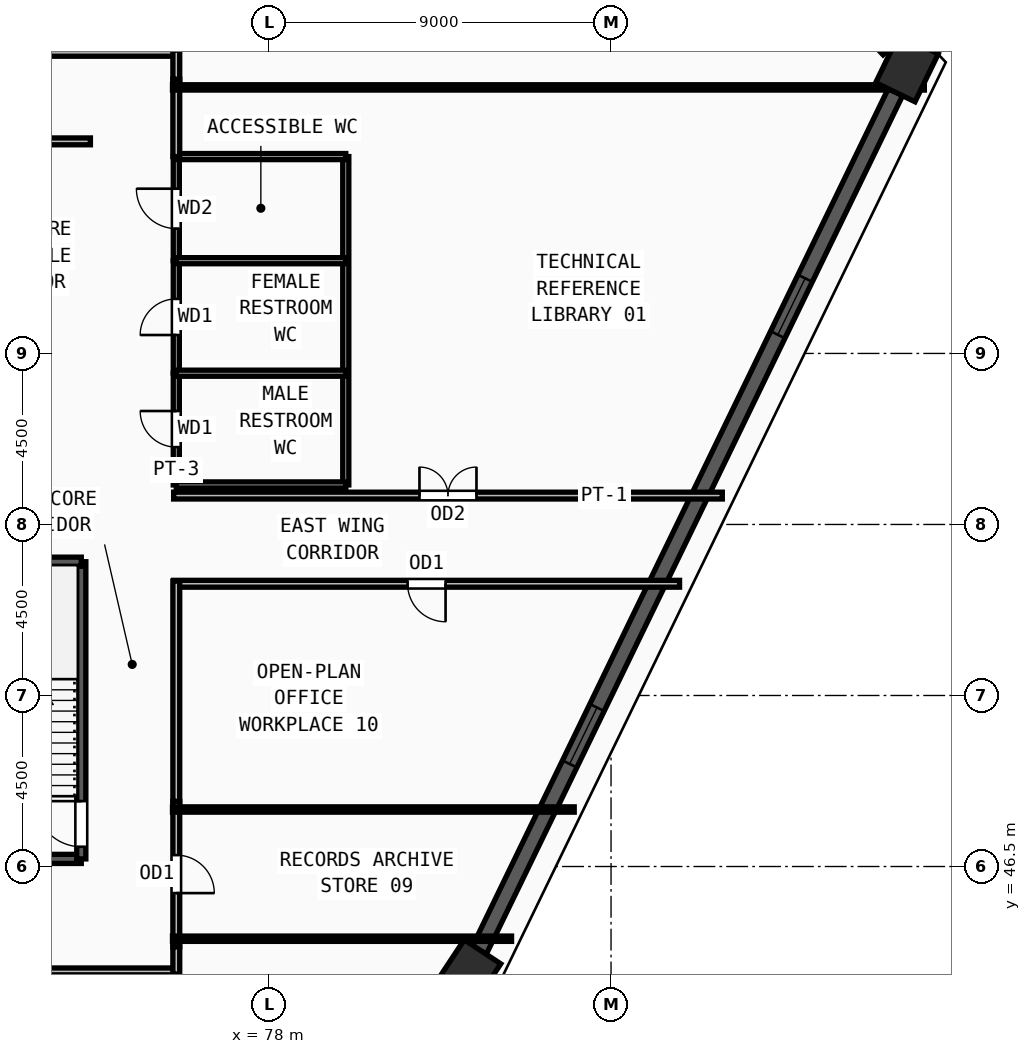
"""IFC4 building model, lengths in metres.
Left out: names, types, materials, properties, quantities, classifications, styles, units other than length and angle.
Written with IfcOpenShell. Run it as: python <this file> out.ifc"""

import sys

from ifc_helpers import new_model, si_unit, direction, frame, frame_2d, origin, origin_2d, place, context, subcontext, project, spatial, rectangle, extrude, source, transform, mapped, element, fill, save


model = new_model("IFC4")
c1 = context("Model", 3, precision=1e-05, world=origin(), true_north=direction((0.0, 1.0)))
c2 = subcontext(c1, "Body", "Model", "MODEL_VIEW")
j1 = project(units=[si_unit("LENGTHUNIT", "METRE"), si_unit("PLANEANGLEUNIT", "RADIAN")], contexts=[c1])
p1 = place(None, origin())
s1 = spatial("IfcSite", under=j1, at=p1, CompositionType="ELEMENT")
p2 = place(p1, origin())
s2 = spatial("IfcBuilding", under=s1, at=p2, CompositionType="ELEMENT")
p3 = place(p2, frame((0.0, 0.0, 166.5)))
s3 = spatial("IfcBuildingStorey", under=s2, at=p3, CompositionType="ELEMENT", Elevation=166.5)
m1 = source(origin(), c2, "Body", "SweptSolid", [
    extrude(rectangle(XDim=1.4, YDim=1.15, at=origin_2d()), origin(), (0.0, 0.0, 1.0), 3.75),
])
for number, where, z_axis, x_axis in (
    (1, (94.787, 67.503, 0.0), (0.0, 0.0, 1.0), (0.436, 0.9, 0.0)),
    (2, (83.232, 43.672, 0.0), (0.0, 0.0, 1.0), (0.551, 0.834, 0.0)),
):
    element("IfcColumn", number, at=place(p3, frame(where, z_axis=z_axis, x_axis=x_axis)), inside=s3, PredefinedType="COLUMN", context=c2, shape_type="MappedRepresentation", body=[
        mapped(m1, transform((0.0, 0.0, 0.0), x_axis=(1.0, 0.0, 0.0), y_axis=(0.0, 1.0, 0.0), z_axis=(0.0, 0.0, 1.0), scale=1.0)),
    ])
p4 = place(p3, frame((83.533, 44.293, 0.0), z_axis=(0.0, 0.0, 1.0), x_axis=(0.43630023006, 0.899801149838, 0.0)))
e3 = element("IfcWall", 3, at=p4, inside=s3, PredefinedType="SOLIDWALL", context=c2, shape_type="SweptSolid", body=[
    extrude(rectangle(XDim=25.104, YDim=0.42, at=frame_2d((12.552, 0.0))), origin(), (0.0, 0.0, 1.0), 3.57),
])
m2 = source(origin(), c2, "Body", "SweptSolid", [
    extrude(rectangle(XDim=1.65, YDim=1.95, at=frame_2d((0.825, 0.975))), frame((0.0, 0.22, 0.0), z_axis=(0.0, -1.0, 0.0), x_axis=(1.0, 0.0, 0.0)), (0.0, 0.0, 1.0), 0.44),
])
p5 = place(p4, frame((5.451, 0.0, 0.55)))
e4 = element("IfcOpeningElement", 4, at=p5, cuts=e3, PredefinedType="OPENING", context=c2, shape_type="MappedRepresentation", body=[
    mapped(m2, transform((0.0, 0.0, 0.0), x_axis=(1.0, 0.0, 0.0), y_axis=(0.0, 1.0, 0.0), z_axis=(0.0, 0.0, 1.0), scale=1.0)),
])
p6 = place(p4, frame((18.003, 0.0, 0.55)))
e5 = element("IfcOpeningElement", 5, at=p6, cuts=e3, PredefinedType="OPENING", context=c2, shape_type="MappedRepresentation", body=[
    mapped(m2, transform((0.0, 0.0, 0.0), x_axis=(1.0, 0.0, 0.0), y_axis=(0.0, 1.0, 0.0), z_axis=(0.0, 0.0, 1.0), scale=1.0)),
])
p7 = place(p3, frame((94.311, 68.003, 0.0), z_axis=(0.0, 0.0, 1.0), x_axis=(-0.689155878993, 0.724613120534, 0.0)))
e6 = element("IfcWall", 6, at=p7, inside=s3, PredefinedType="SOLIDWALL", context=c2, shape_type="SweptSolid", body=[
    extrude(rectangle(XDim=4.482, YDim=0.42, at=frame_2d((2.241, 0.0))), origin(), (0.0, 0.0, 1.0), 3.57),
])
m3 = source(origin(), c2, "Body", "SweptSolid", [
    extrude(rectangle(XDim=1.2, YDim=1.9, at=frame_2d((0.6, 0.95))), frame((0.0, 0.22, 0.0), z_axis=(0.0, -1.0, 0.0), x_axis=(1.0, 0.0, 0.0)), (0.0, 0.0, 1.0), 0.44),
])
p8 = place(p7, frame((1.641, 0.0, 0.55)))
e7 = element("IfcOpeningElement", 7, at=p8, cuts=e6, PredefinedType="OPENING", context=c2, shape_type="MappedRepresentation", body=[
    mapped(m3, transform((0.0, 0.0, 0.0), x_axis=(1.0, 0.0, 0.0), y_axis=(0.0, 1.0, 0.0), z_axis=(0.0, 0.0, 1.0), scale=1.0)),
])
p9 = place(p3, frame((69.62, 46.7, 0.0), z_axis=(0.0, 0.0, 1.0), x_axis=(1.0, 0.0, 0.0)))
e8 = element("IfcWall", 8, at=p9, inside=s3, PredefinedType="SOLIDWALL", context=c2, shape_type="SweptSolid", body=[
    extrude(rectangle(XDim=3.44, YDim=0.24, at=frame_2d((1.72, 0.0))), origin(), (0.0, 0.0, 1.0), 3.57),
])
p10 = place(p3, frame((73.06, 46.7, 0.0), z_axis=(0.0, 0.0, 1.0), x_axis=(0.0, 1.0, 0.0)))
e9 = element("IfcWall", 9, at=p10, inside=s3, PredefinedType="SOLIDWALL", context=c2, shape_type="SweptSolid", body=[
    extrude(rectangle(XDim=7.82, YDim=0.24, at=frame_2d((3.91, 0.0))), origin(), (0.0, 0.0, 1.0), 3.57),
])
m4 = source(origin(), c2, "Body", "SweptSolid", [
    extrude(rectangle(XDim=1.2, YDim=2.2, at=frame_2d((0.6, 1.1))), frame((0.0, 0.13, 0.0), z_axis=(0.0, -1.0, 0.0), x_axis=(1.0, 0.0, 0.0)), (0.0, 0.0, 1.0), 0.26),
])
p11 = place(p10, frame((0.32, 0.0, 0.0)))
e10 = element("IfcOpeningElement", 10, at=p11, cuts=e9, PredefinedType="OPENING", context=c2, shape_type="MappedRepresentation", body=[
    mapped(m4, transform((0.0, 0.0, 0.0), x_axis=(1.0, 0.0, 0.0), y_axis=(0.0, 1.0, 0.0), z_axis=(0.0, 0.0, 1.0), scale=1.0)),
])
p12 = place(p3, frame((73.06, 54.52, 0.0), z_axis=(0.0, 0.0, 1.0), x_axis=(-1.0, 0.0, 0.0)))
e11 = element("IfcWall", 11, at=p12, inside=s3, PredefinedType="SOLIDWALL", context=c2, shape_type="SweptSolid", body=[
    extrude(rectangle(XDim=3.44, YDim=0.24, at=frame_2d((1.72, 0.0))), origin(), (0.0, 0.0, 1.0), 3.57),
])
p13 = place(p3, frame((75.56, 56.54, 0.0), z_axis=(0.0, 0.0, 1.0), x_axis=(0.0, 1.0, 0.0)))
e12 = element("IfcWall", 12, at=p13, inside=s3, PredefinedType="PARTITIONING", context=c2, shape_type="SweptSolid", body=[
    extrude(rectangle(XDim=2.94, YDim=0.16, at=frame_2d((1.47, 0.0))), origin(), (0.0, 0.0, 1.0), 3.57),
])
m5 = source(origin(), c2, "Body", "SweptSolid", [
    extrude(rectangle(XDim=0.95, YDim=2.15, at=frame_2d((0.475, 1.075))), frame((0.0, 0.09, 0.0), z_axis=(0.0, -1.0, 0.0), x_axis=(1.0, 0.0, 0.0)), (0.0, 0.0, 1.0), 0.18),
])
p14 = place(p13, frame((0.995, 0.0, 0.0)))
e13 = element("IfcOpeningElement", 13, at=p14, cuts=e12, PredefinedType="OPENING", context=c2, shape_type="MappedRepresentation", body=[
    mapped(m5, transform((0.0, 0.0, 0.0), x_axis=(1.0, 0.0, 0.0), y_axis=(0.0, 1.0, 0.0), z_axis=(0.0, 0.0, 1.0), scale=1.0)),
])
p15 = place(p3, frame((75.56, 59.48, 0.0), z_axis=(0.0, 0.0, 1.0), x_axis=(0.0, 1.0, 0.0)))
e14 = element("IfcWall", 14, at=p15, inside=s3, PredefinedType="PARTITIONING", context=c2, shape_type="SweptSolid", body=[
    extrude(rectangle(XDim=2.96, YDim=0.16, at=frame_2d((1.48, 0.0))), origin(), (0.0, 0.0, 1.0), 3.57),
])
p16 = place(p15, frame((1.005, 0.0, 0.0)))
e15 = element("IfcOpeningElement", 15, at=p16, cuts=e14, PredefinedType="OPENING", context=c2, shape_type="MappedRepresentation", body=[
    mapped(m5, transform((0.0, 0.0, 0.0), x_axis=(1.0, 0.0, 0.0), y_axis=(0.0, 1.0, 0.0), z_axis=(0.0, 0.0, 1.0), scale=1.0)),
])
p17 = place(p3, frame((75.56, 62.44, 0.0), z_axis=(0.0, 0.0, 1.0), x_axis=(0.0, 1.0, 0.0)))
e16 = element("IfcWall", 16, at=p17, inside=s3, PredefinedType="PARTITIONING", context=c2, shape_type="SweptSolid", body=[
    extrude(rectangle(XDim=2.74, YDim=0.16, at=frame_2d((1.37, 0.0))), origin(), (0.0, 0.0, 1.0), 3.57),
])
m6 = source(origin(), c2, "Body", "SweptSolid", [
    extrude(rectangle(XDim=1.05, YDim=2.15, at=frame_2d((0.525, 1.075))), frame((0.0, 0.09, 0.0), z_axis=(0.0, -1.0, 0.0), x_axis=(1.0, 0.0, 0.0)), (0.0, 0.0, 1.0), 0.18),
])
p18 = place(p17, frame((0.845, 0.0, 0.0)))
e17 = element("IfcOpeningElement", 17, at=p18, cuts=e16, PredefinedType="OPENING", context=c2, shape_type="MappedRepresentation", body=[
    mapped(m6, transform((0.0, 0.0, 0.0), x_axis=(1.0, 0.0, 0.0), y_axis=(0.0, 1.0, 0.0), z_axis=(0.0, 0.0, 1.0), scale=1.0)),
])
p19 = place(p3, frame((69.46, 65.58, 0.0), z_axis=(0.0, 0.0, 1.0), x_axis=(1.0, 0.0, 0.0)))
e18 = element("IfcWall", 18, at=p19, inside=s3, PredefinedType="PARTITIONING", context=c2, shape_type="SweptSolid", body=[
    extrude(rectangle(XDim=3.84, YDim=0.18, at=frame_2d((1.92, 0.0))), origin(), (0.0, 0.0, 1.0), 3.57),
])
m7 = source(origin(), c2, "Body", "SweptSolid", [
    extrude(rectangle(XDim=1.3, YDim=2.2, at=frame_2d((0.65, 1.1))), frame((0.0, 0.1, 0.0), z_axis=(0.0, -1.0, 0.0), x_axis=(1.0, 0.0, 0.0)), (0.0, 0.0, 1.0), 0.2),
])
p20 = place(p19, frame((1.27, 0.0, 0.0)))
e19 = element("IfcOpeningElement", 19, at=p20, cuts=e18, PredefinedType="OPENING", context=c2, shape_type="MappedRepresentation", body=[
    mapped(m7, transform((0.0, 0.0, 0.0), x_axis=(1.0, 0.0, 0.0), y_axis=(0.0, 1.0, 0.0), z_axis=(0.0, 0.0, 1.0), scale=1.0)),
])
p21 = place(p3, frame((75.49, 56.26, 0.0), z_axis=(0.0, 0.0, 1.0), x_axis=(1.0, 0.0, 0.0)))
e20 = element("IfcWall", 20, at=p21, inside=s3, PredefinedType="PARTITIONING", context=c2, shape_type="SweptSolid", body=[
    extrude(rectangle(XDim=14.438, YDim=0.18, at=frame_2d((7.219, 0.0))), origin(), (0.0, 0.0, 1.0), 3.57),
])
m8 = source(origin(), c2, "Body", "SweptSolid", [
    extrude(rectangle(XDim=1.5, YDim=2.2, at=frame_2d((0.75, 1.1))), frame((0.0, 0.1, 0.0), z_axis=(0.0, -1.0, 0.0), x_axis=(1.0, 0.0, 0.0)), (0.0, 0.0, 1.0), 0.2),
])
p22 = place(p21, frame((6.469, 0.0, 0.0)))
e21 = element("IfcOpeningElement", 21, at=p22, cuts=e20, PredefinedType="OPENING", context=c2, shape_type="MappedRepresentation", body=[
    mapped(m8, transform((0.0, 0.0, 0.0), x_axis=(1.0, 0.0, 0.0), y_axis=(0.0, 1.0, 0.0), z_axis=(0.0, 0.0, 1.0), scale=1.0)),
])
p23 = place(p3, frame((61.785, 67.91, 0.0), z_axis=(0.0, 0.0, 1.0), x_axis=(1.0, 0.0, 0.0)))
e22 = element("IfcWall", 22, at=p23, inside=s3, PredefinedType="PARTITIONING", context=c2, shape_type="SweptSolid", body=[
    extrude(rectangle(XDim=13.845, YDim=0.18, at=frame_2d((6.922, 0.0))), origin(), (0.0, 0.0, 1.0), 3.57),
])
p24 = place(p23, frame((6.172, 0.0, 0.0)))
e23 = element("IfcOpeningElement", 23, at=p24, cuts=e22, PredefinedType="OPENING", context=c2, shape_type="MappedRepresentation", body=[
    mapped(m8, transform((0.0, 0.0, 0.0), x_axis=(1.0, 0.0, 0.0), y_axis=(0.0, 1.0, 0.0), z_axis=(0.0, 0.0, 1.0), scale=1.0)),
])
p25 = place(p3, frame((75.63, 43.74, 0.0), z_axis=(0.0, 0.0, 1.0), x_axis=(-1.0, 0.0, 0.0)))
e24 = element("IfcWall", 24, at=p25, inside=s3, PredefinedType="PARTITIONING", context=c2, shape_type="SweptSolid", body=[
    extrude(rectangle(XDim=31.26, YDim=0.18, at=frame_2d((15.63, 0.0))), origin(), (0.0, 0.0, 1.0), 3.57),
])
p26 = place(p25, frame((10.08, 0.0, 0.0)))
e25 = element("IfcOpeningElement", 25, at=p26, cuts=e24, PredefinedType="OPENING", context=c2, shape_type="MappedRepresentation", body=[
    mapped(m8, transform((0.0, 0.0, 0.0), x_axis=(1.0, 0.0, 0.0), y_axis=(0.0, 1.0, 0.0), z_axis=(0.0, 0.0, 1.0), scale=1.0)),
])
p27 = place(p3, frame((75.56, 48.215, 0.0), z_axis=(0.0, 0.0, 1.0), x_axis=(0.0, -1.0, 0.0)))
e26 = element("IfcWall", 26, at=p27, inside=s3, PredefinedType="PARTITIONING", context=c2, shape_type="SweptSolid", body=[
    extrude(rectangle(XDim=3.83, YDim=0.18, at=frame_2d((1.915, 0.0))), origin(), (0.0, 0.0, 1.0), 3.155),
])
m9 = source(origin(), c2, "Body", "SweptSolid", [
    extrude(rectangle(XDim=1.0, YDim=2.2, at=frame_2d((0.5, 1.1))), frame((0.0, 0.1, 0.0), z_axis=(0.0, -1.0, 0.0), x_axis=(1.0, 0.0, 0.0)), (0.0, 0.0, 1.0), 0.2),
])
p28 = place(p27, frame((1.415, 0.0, 0.0)))
e27 = element("IfcOpeningElement", 27, at=p28, cuts=e26, PredefinedType="OPENING", context=c2, shape_type="MappedRepresentation", body=[
    mapped(m9, transform((0.0, 0.0, 0.0), x_axis=(1.0, 0.0, 0.0), y_axis=(0.0, 1.0, 0.0), z_axis=(0.0, 0.0, 1.0), scale=1.0)),
])
p29 = place(p3, frame((88.803, 53.94, 0.0), z_axis=(0.0, 0.0, 1.0), x_axis=(-1.0, 0.0, 0.0)))
e28 = element("IfcWall", 28, at=p29, inside=s3, PredefinedType="PARTITIONING", context=c2, shape_type="SweptSolid", body=[
    extrude(rectangle(XDim=13.313, YDim=0.18, at=frame_2d((6.656, 0.0))), origin(), (0.0, 0.0, 1.0), 3.57),
])
p30 = place(p29, frame((6.157, 0.0, 0.0)))
e29 = element("IfcOpeningElement", 29, at=p30, cuts=e28, PredefinedType="OPENING", context=c2, shape_type="MappedRepresentation", body=[
    mapped(m9, transform((0.0, 0.0, 0.0), x_axis=(1.0, 0.0, 0.0), y_axis=(0.0, 1.0, 0.0), z_axis=(0.0, 0.0, 1.0), scale=1.0)),
])
p31 = place(p3, frame((80.02, 56.54, 0.0), z_axis=(0.0, 0.0, 1.0), x_axis=(0.0, 1.0, 0.0)))
e30 = element("IfcWall", 30, at=p31, inside=s3, PredefinedType="PARTITIONING", context=c2, shape_type="SweptSolid", body=[
    extrude(rectangle(XDim=8.64, YDim=0.16, at=frame_2d((4.32, 0.0))), origin(), (0.0, 0.0, 1.0), 3.57),
])
for number, where, z_axis, x_axis in (
    (31, (75.56, 56.54, 0.0), (0.0, 0.0, 1.0), (1.0, 0.0, 0.0)),
    (32, (75.56, 59.48, 0.0), (0.0, 0.0, 1.0), (1.0, 0.0, 0.0)),
    (33, (75.56, 62.44, 0.0), (0.0, 0.0, 1.0), (1.0, 0.0, 0.0)),
    (34, (75.56, 65.18, 0.0), (0.0, 0.0, 1.0), (1.0, 0.0, 0.0)),
):
    element("IfcWall", number, at=place(p3, frame(where, z_axis=z_axis, x_axis=x_axis)), inside=s3, PredefinedType="PARTITIONING", context=c2, shape_type="SweptSolid", body=[
        extrude(rectangle(XDim=4.46, YDim=0.16, at=frame_2d((2.23, 0.0))), origin(), (0.0, 0.0, 1.0), 3.57),
    ])
p32 = place(p3, frame((75.56, 67.215, 0.0), z_axis=(0.0, 0.0, 1.0), x_axis=(0.0, -1.0, 0.0)))
e35 = element("IfcWall", 35, at=p32, inside=s3, PredefinedType="PARTITIONING", context=c2, shape_type="SweptSolid", body=[
    extrude(rectangle(XDim=2.035, YDim=0.18, at=frame_2d((1.018, 0.0))), origin(), (0.0, 0.0, 1.0), 3.57),
])
p33 = place(p3, frame((75.56, 67.98, 0.0), z_axis=(0.0, 0.0, 1.0), x_axis=(0.0, -1.0, 0.0)))
e36 = element("IfcWall", 36, at=p33, inside=s3, PredefinedType="PARTITIONING", context=c2, shape_type="SweptSolid", body=[
    extrude(rectangle(XDim=0.765, YDim=0.18, at=frame_2d((0.382, 0.0))), origin(), (0.0, 0.0, 1.0), 3.57),
])
p34 = place(p3, frame((75.56, 44.385, 0.0), z_axis=(0.0, 0.0, 1.0), x_axis=(0.0, -1.0, 0.0)))
e37 = element("IfcWall", 37, at=p34, inside=s3, PredefinedType="PARTITIONING", context=c2, shape_type="SweptSolid", body=[
    extrude(rectangle(XDim=0.715, YDim=0.18, at=frame_2d((0.357, 0.0))), origin(), (0.0, 0.0, 1.0), 3.57),
])
p35 = place(p3, frame((75.56, 54.01, 0.0), z_axis=(0.0, 0.0, 1.0), x_axis=(0.0, -1.0, 0.0)))
e38 = element("IfcWall", 38, at=p35, inside=s3, PredefinedType="PARTITIONING", context=c2, shape_type="SweptSolid", body=[
    extrude(rectangle(XDim=5.795, YDim=0.18, at=frame_2d((2.897, 0.0))), origin(), (0.0, 0.0, 1.0), 3.57),
])
p36 = place(p3, frame((75.46, 44.6, 0.0), z_axis=(0.0, 0.0, 1.0), x_axis=(1.0, 0.0, 0.0)))
e39 = element("IfcWall", 39, at=p36, inside=s3, PredefinedType="PARTITIONING", context=c2, shape_type="SweptSolid", body=[
    extrude(rectangle(XDim=8.922, YDim=0.14, at=frame_2d((4.461, 0.0))), origin(), (0.0, 0.0, 1.0), 3.57),
])
p37 = place(p3, frame((75.46, 48.0, 0.0), z_axis=(0.0, 0.0, 1.0), x_axis=(1.0, 0.0, 0.0)))
e40 = element("IfcWall", 40, at=p37, inside=s3, PredefinedType="PARTITIONING", context=c2, shape_type="SweptSolid", body=[
    extrude(rectangle(XDim=10.571, YDim=0.14, at=frame_2d((5.286, 0.0))), origin(), (0.0, 0.0, 1.0), 3.57),
])
p38 = place(p3, frame((75.46, 67.0, 0.0), z_axis=(0.0, 0.0, 1.0), x_axis=(1.0, 0.0, 0.0)))
e41 = element("IfcWall", 41, at=p38, inside=s3, PredefinedType="PARTITIONING", context=c2, shape_type="SweptSolid", body=[
    extrude(rectangle(XDim=19.784, YDim=0.14, at=frame_2d((9.892, 0.0))), origin(), (0.0, 0.0, 1.0), 2.755),
])
m10 = source(origin(), c2, "Body", "SweptSolid", [
    extrude(rectangle(XDim=1.65, YDim=1.95, at=frame_2d((0.825, 0.975))), frame((0.0, 0.03, 0.0), z_axis=(0.0, -1.0, 0.0), x_axis=(1.0, 0.0, 0.0)), (0.0, 0.0, 1.0), 0.06),
])
p39 = place(p5, origin())
e42 = element("IfcWindow", 42, at=p39, inside=s3, PartitioningType="DOUBLE_PANEL_VERTICAL", PredefinedType="WINDOW", context=c2, shape_type="MappedRepresentation", body=[
    mapped(m10, transform((0.0, 0.0, 0.0), x_axis=(1.0, 0.0, 0.0), y_axis=(0.0, 1.0, 0.0), z_axis=(0.0, 0.0, 1.0), scale=1.0)),
])
fill(e4, e42)
p40 = place(p6, origin())
e43 = element("IfcWindow", 43, at=p40, inside=s3, PartitioningType="DOUBLE_PANEL_VERTICAL", PredefinedType="WINDOW", context=c2, shape_type="MappedRepresentation", body=[
    mapped(m10, transform((0.0, 0.0, 0.0), x_axis=(1.0, 0.0, 0.0), y_axis=(0.0, 1.0, 0.0), z_axis=(0.0, 0.0, 1.0), scale=1.0)),
])
fill(e5, e43)
m11 = source(origin(), c2, "Body", "SweptSolid", [
    extrude(rectangle(XDim=1.2, YDim=2.2, at=frame_2d((0.6, 1.1))), frame((0.0, 0.025, 0.0), z_axis=(0.0, -1.0, 0.0), x_axis=(1.0, 0.0, 0.0)), (0.0, 0.0, 1.0), 0.05),
])
p41 = place(p11, origin())
e44 = element("IfcDoor", 44, at=p41, inside=s3, OperationType="SINGLE_SWING_RIGHT", PredefinedType="DOOR", context=c2, shape_type="MappedRepresentation", body=[
    mapped(m11, transform((0.0, 0.0, 0.0), x_axis=(1.0, 0.0, 0.0), y_axis=(0.0, 1.0, 0.0), z_axis=(0.0, 0.0, 1.0), scale=1.0)),
])
fill(e10, e44)
m12 = source(origin(), c2, "Body", "SweptSolid", [
    extrude(rectangle(XDim=0.95, YDim=2.15, at=frame_2d((0.475, 1.075))), frame((0.0, 0.025, 0.0), z_axis=(0.0, -1.0, 0.0), x_axis=(1.0, 0.0, 0.0)), (0.0, 0.0, 1.0), 0.05),
])
p42 = place(p14, origin())
e45 = element("IfcDoor", 45, at=p42, inside=s3, OperationType="SINGLE_SWING_RIGHT", PredefinedType="DOOR", context=c2, shape_type="MappedRepresentation", body=[
    mapped(m12, transform((0.0, 0.0, 0.0), x_axis=(1.0, 0.0, 0.0), y_axis=(0.0, 1.0, 0.0), z_axis=(0.0, 0.0, 1.0), scale=1.0)),
])
fill(e13, e45)
p43 = place(p16, origin())
e46 = element("IfcDoor", 46, at=p43, inside=s3, OperationType="SINGLE_SWING_LEFT", PredefinedType="DOOR", context=c2, shape_type="MappedRepresentation", body=[
    mapped(m12, transform((0.0, 0.0, 0.0), x_axis=(1.0, 0.0, 0.0), y_axis=(0.0, 1.0, 0.0), z_axis=(0.0, 0.0, 1.0), scale=1.0)),
])
fill(e15, e46)
m13 = source(origin(), c2, "Body", "SweptSolid", [
    extrude(rectangle(XDim=1.05, YDim=2.15, at=frame_2d((0.525, 1.075))), frame((0.0, 0.025, 0.0), z_axis=(0.0, -1.0, 0.0), x_axis=(1.0, 0.0, 0.0)), (0.0, 0.0, 1.0), 0.05),
])
p44 = place(p18, origin())
e47 = element("IfcDoor", 47, at=p44, inside=s3, OperationType="SINGLE_SWING_RIGHT", PredefinedType="DOOR", context=c2, shape_type="MappedRepresentation", body=[
    mapped(m13, transform((0.0, 0.0, 0.0), x_axis=(1.0, 0.0, 0.0), y_axis=(0.0, 1.0, 0.0), z_axis=(0.0, 0.0, 1.0), scale=1.0)),
])
fill(e17, e47)
m14 = source(origin(), c2, "Body", "SweptSolid", [
    extrude(rectangle(XDim=1.5, YDim=2.2, at=frame_2d((0.75, 1.1))), frame((0.0, 0.025, 0.0), z_axis=(0.0, -1.0, 0.0), x_axis=(1.0, 0.0, 0.0)), (0.0, 0.0, 1.0), 0.05),
])
p45 = place(p22, origin())
e48 = element("IfcDoor", 48, at=p45, inside=s3, OperationType="DOUBLE_DOOR_SINGLE_SWING", PredefinedType="DOOR", context=c2, shape_type="MappedRepresentation", body=[
    mapped(m14, transform((0.0, 0.0, 0.0), x_axis=(1.0, 0.0, 0.0), y_axis=(0.0, 1.0, 0.0), z_axis=(0.0, 0.0, 1.0), scale=1.0)),
])
fill(e21, e48)
m15 = source(origin(), c2, "Body", "SweptSolid", [
    extrude(rectangle(XDim=1.0, YDim=2.2, at=frame_2d((0.5, 1.1))), frame((0.0, 0.025, 0.0), z_axis=(0.0, -1.0, 0.0), x_axis=(1.0, 0.0, 0.0)), (0.0, 0.0, 1.0), 0.05),
])
p46 = place(p28, origin())
e49 = element("IfcDoor", 49, at=p46, inside=s3, OperationType="SINGLE_SWING_RIGHT", PredefinedType="DOOR", context=c2, shape_type="MappedRepresentation", body=[
    mapped(m15, transform((0.0, 0.0, 0.0), x_axis=(1.0, 0.0, 0.0), y_axis=(0.0, 1.0, 0.0), z_axis=(0.0, 0.0, 1.0), scale=1.0)),
])
fill(e27, e49)
p47 = place(p30, origin())
e50 = element("IfcDoor", 50, at=p47, inside=s3, OperationType="SINGLE_SWING_LEFT", PredefinedType="DOOR", context=c2, shape_type="MappedRepresentation", body=[
    mapped(m15, transform((0.0, 0.0, 0.0), x_axis=(1.0, 0.0, 0.0), y_axis=(0.0, 1.0, 0.0), z_axis=(0.0, 0.0, 1.0), scale=1.0)),
])
fill(e29, e50)
save(model, sys.argv[1])
